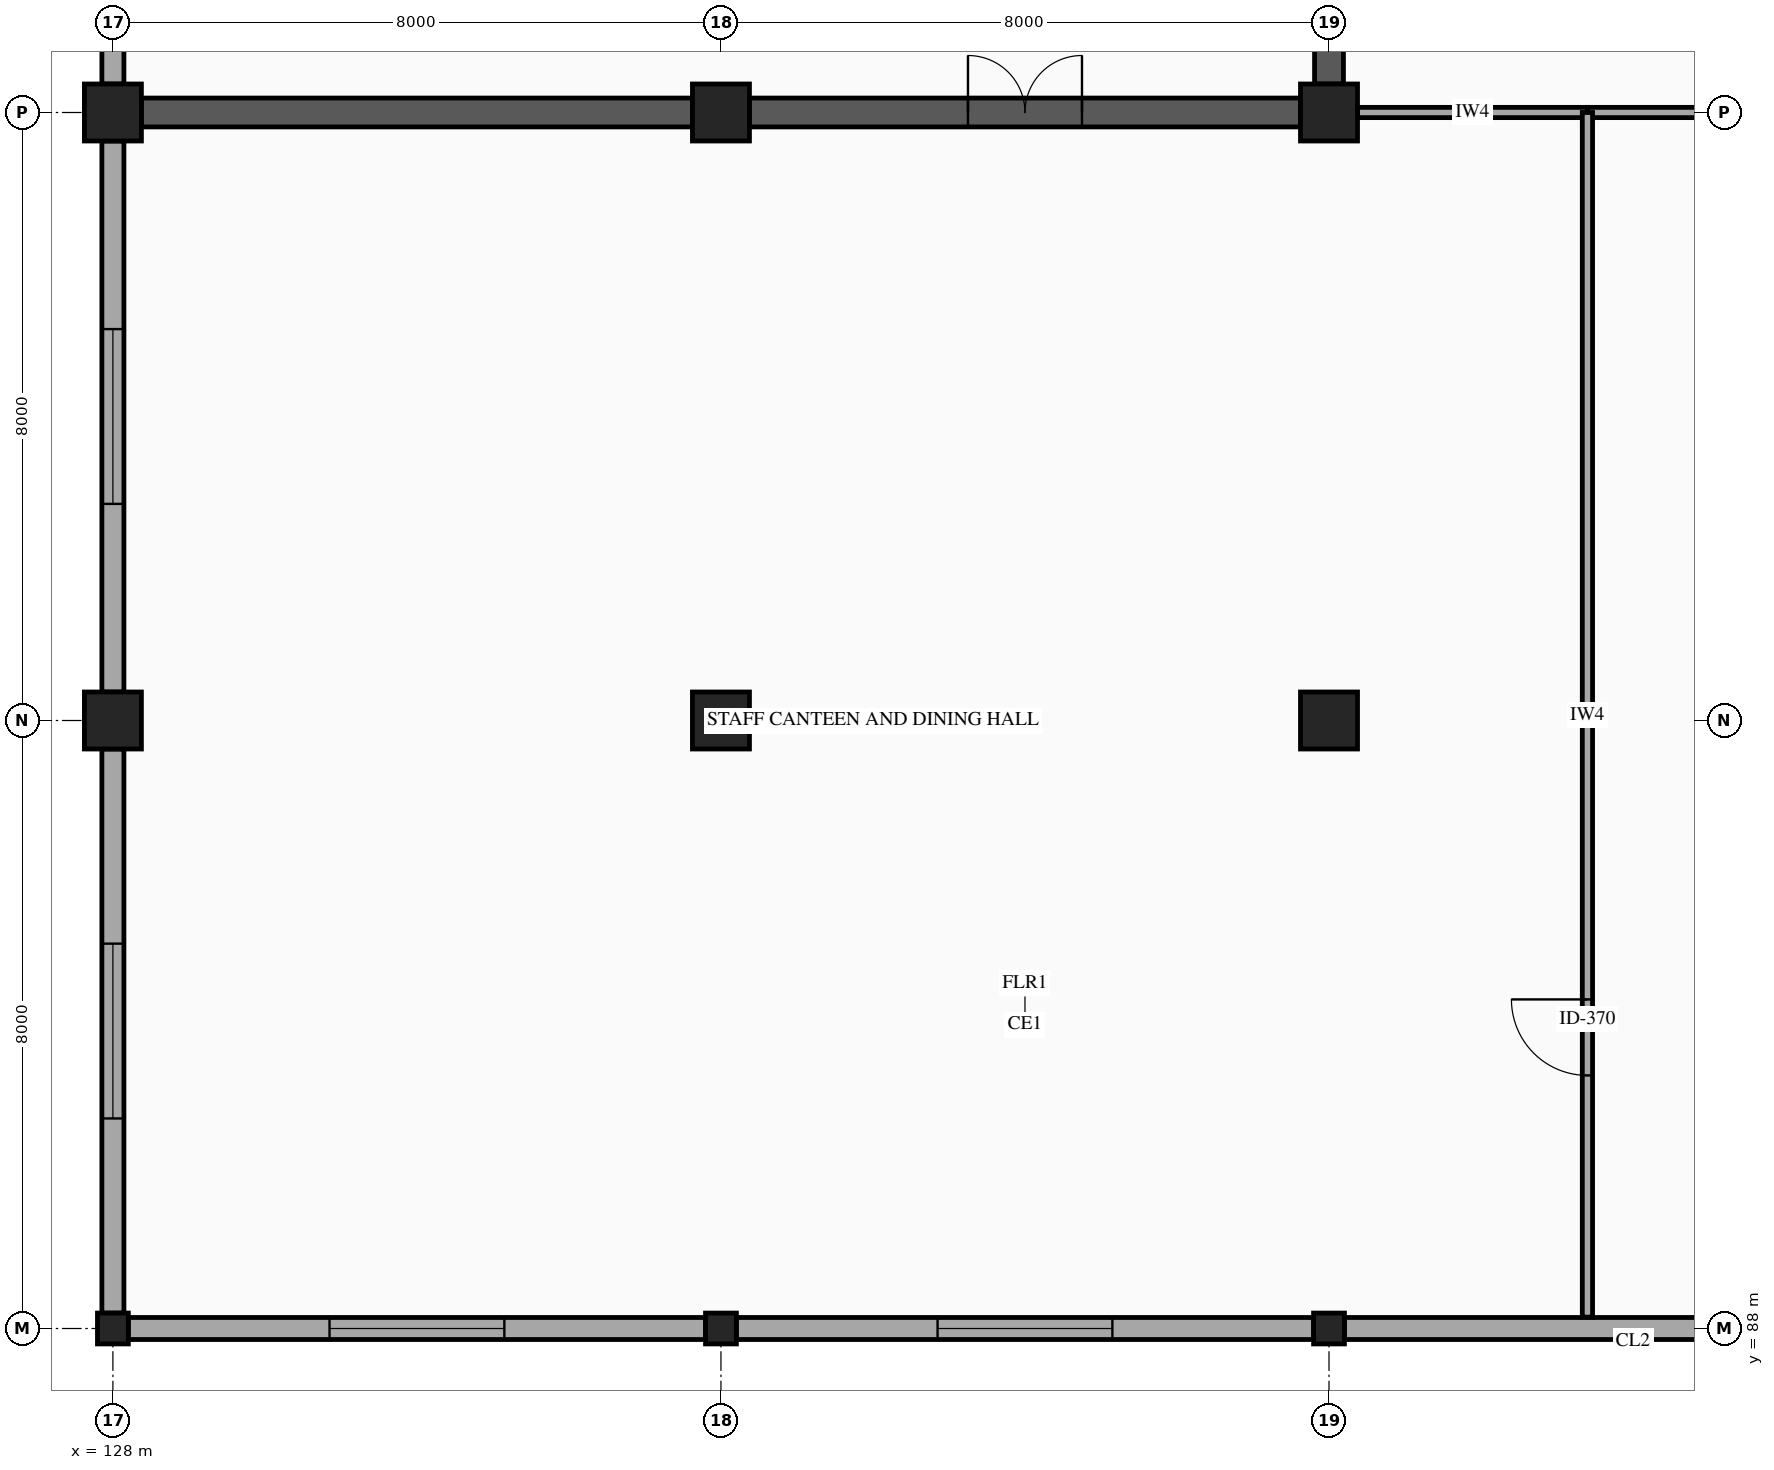
"""IFC4 building model, lengths in metres.
Left out: names, types, materials, properties, quantities, classifications, styles, units other than length and angle.
Written with IfcOpenShell. Run it as: python <this file> out.ifc"""

import sys

from ifc_helpers import new_model, si_unit, direction, frame, frame_2d, origin, origin_2d, place, context, subcontext, project, spatial, rectangle, hollow_circle, extrude, element, fill, save


model = new_model("IFC4")
c1 = context("Model", 3, precision=1e-05, world=origin(), true_north=direction((0.0, 1.0)))
c2 = subcontext(c1, "Body", "Model", "MODEL_VIEW")
j1 = project(units=[si_unit("LENGTHUNIT", "METRE"), si_unit("PLANEANGLEUNIT", "RADIAN")], contexts=[c1])
p1 = place(None, origin())
s1 = spatial("IfcSite", under=j1, at=p1, CompositionType="ELEMENT")
p2 = place(p1, origin())
s2 = spatial("IfcBuilding", under=s1, at=p2, CompositionType="ELEMENT")
p3 = place(p2, frame((0.0, 0.0, 23.9)))
s3 = spatial("IfcBuildingStorey", under=s2, at=p3, CompositionType="ELEMENT", Elevation=23.9)
p4 = place(p3, frame((128.0, 88.0, 0.0), z_axis=(0.0, 0.0, 1.0), x_axis=(1.0, 0.0, 0.0)))
e1 = element("IfcColumn", 1, at=p4, inside=s3, PredefinedType="COLUMN", context=c2, shape_type="SweptSolid", body=[
    extrude(hollow_circle(Radius=0.203, WallThickness=0.012, at=origin_2d()), origin(), (0.0, 0.0, 1.0), 4.5),
])
for number, where, z_axis, x_axis in (
    (2, (128.0, 96.0, 0.0), (0.0, 0.0, 1.0), (1.0, 0.0, 0.0)),
    (3, (128.0, 104.0, 0.0), (0.0, 0.0, 1.0), (1.0, 0.0, 0.0)),
):
    element("IfcColumn", number, at=place(p3, frame(where, z_axis=z_axis, x_axis=x_axis)), inside=s3, PredefinedType="COLUMN", context=c2, shape_type="SweptSolid", body=[
        extrude(rectangle(XDim=0.75, YDim=0.75, at=origin_2d()), origin(), (0.0, 0.0, 1.0), 4.5),
    ])
p5 = place(p3, frame((136.0, 88.0, 0.0), z_axis=(0.0, 0.0, 1.0), x_axis=(1.0, 0.0, 0.0)))
e4 = element("IfcColumn", 4, at=p5, inside=s3, PredefinedType="COLUMN", context=c2, shape_type="SweptSolid", body=[
    extrude(hollow_circle(Radius=0.203, WallThickness=0.012, at=origin_2d()), origin(), (0.0, 0.0, 1.0), 4.5),
])
for number, where, z_axis, x_axis in (
    (5, (136.0, 96.0, 0.0), (0.0, 0.0, 1.0), (1.0, 0.0, 0.0)),
    (6, (136.0, 104.0, 0.0), (0.0, 0.0, 1.0), (1.0, 0.0, 0.0)),
):
    element("IfcColumn", number, at=place(p3, frame(where, z_axis=z_axis, x_axis=x_axis)), inside=s3, PredefinedType="COLUMN", context=c2, shape_type="SweptSolid", body=[
        extrude(rectangle(XDim=0.75, YDim=0.75, at=origin_2d()), origin(), (0.0, 0.0, 1.0), 4.5),
    ])
p6 = place(p3, frame((144.0, 88.0, 0.0), z_axis=(0.0, 0.0, 1.0), x_axis=(1.0, 0.0, 0.0)))
e7 = element("IfcColumn", 7, at=p6, inside=s3, PredefinedType="COLUMN", context=c2, shape_type="SweptSolid", body=[
    extrude(hollow_circle(Radius=0.203, WallThickness=0.012, at=origin_2d()), origin(), (0.0, 0.0, 1.0), 4.5),
])
for number, where, z_axis, x_axis in (
    (8, (144.0, 96.0, 0.0), (0.0, 0.0, 1.0), (1.0, 0.0, 0.0)),
    (9, (144.0, 104.0, 0.0), (0.0, 0.0, 1.0), (1.0, 0.0, 0.0)),
):
    element("IfcColumn", number, at=place(p3, frame(where, z_axis=z_axis, x_axis=x_axis)), inside=s3, PredefinedType="COLUMN", context=c2, shape_type="SweptSolid", body=[
        extrude(rectangle(XDim=0.75, YDim=0.75, at=origin_2d()), origin(), (0.0, 0.0, 1.0), 4.5),
    ])
p7 = place(p3, frame((151.625, 88.0, 0.0), z_axis=(0.0, 0.0, 1.0), x_axis=(-1.0, 0.0, 0.0)))
e10 = element("IfcWall", 10, at=p7, inside=s3, PredefinedType="STANDARD", context=c2, shape_type="SweptSolid", body=[
    extrude(rectangle(XDim=7.422, YDim=0.29, at=frame_2d((3.711, 0.0))), origin(), (0.0, 0.0, 1.0), 3.48),
])
p8 = place(p3, frame((143.797, 88.0, 0.0), z_axis=(0.0, 0.0, 1.0), x_axis=(-1.0, 0.0, 0.0)))
e11 = element("IfcWall", 11, at=p8, inside=s3, PredefinedType="STANDARD", context=c2, shape_type="SweptSolid", body=[
    extrude(rectangle(XDim=7.594, YDim=0.29, at=frame_2d((3.797, 0.0))), origin(), (0.0, 0.0, 1.0), 3.48),
])
p9 = place(p8, frame((2.647, 0.0, 0.8)))
e12 = element("IfcOpeningElement", 12, at=p9, cuts=e11, PredefinedType="OPENING", context=c2, shape_type="SweptSolid", body=[
    extrude(rectangle(XDim=2.3, YDim=1.75, at=frame_2d((1.15, 0.875))), frame((0.0, 0.155, 0.0), z_axis=(0.0, -1.0, 0.0), x_axis=(1.0, 0.0, 0.0)), (0.0, 0.0, 1.0), 0.31),
])
p10 = place(p3, frame((135.797, 88.0, 0.0), z_axis=(0.0, 0.0, 1.0), x_axis=(-1.0, 0.0, 0.0)))
e13 = element("IfcWall", 13, at=p10, inside=s3, PredefinedType="STANDARD", context=c2, shape_type="SweptSolid", body=[
    extrude(rectangle(XDim=7.594, YDim=0.29, at=frame_2d((3.797, 0.0))), origin(), (0.0, 0.0, 1.0), 3.48),
])
p11 = place(p10, frame((2.647, 0.0, 0.8)))
e14 = element("IfcOpeningElement", 14, at=p11, cuts=e13, PredefinedType="OPENING", context=c2, shape_type="SweptSolid", body=[
    extrude(rectangle(XDim=2.3, YDim=1.75, at=frame_2d((1.15, 0.875))), frame((0.0, 0.155, 0.0), z_axis=(0.0, -1.0, 0.0), x_axis=(1.0, 0.0, 0.0)), (0.0, 0.0, 1.0), 0.31),
])
p12 = place(p3, frame((128.0, 88.203, 0.0), z_axis=(0.0, 0.0, 1.0), x_axis=(0.0, 1.0, 0.0)))
e15 = element("IfcWall", 15, at=p12, inside=s3, PredefinedType="STANDARD", context=c2, shape_type="SweptSolid", body=[
    extrude(rectangle(XDim=7.422, YDim=0.29, at=frame_2d((3.711, 0.0))), origin(), (0.0, 0.0, 1.0), 3.48),
])
p13 = place(p12, frame((2.561, 0.0, 0.8)))
e16 = element("IfcOpeningElement", 16, at=p13, cuts=e15, PredefinedType="OPENING", context=c2, shape_type="SweptSolid", body=[
    extrude(rectangle(XDim=2.3, YDim=1.75, at=frame_2d((1.15, 0.875))), frame((0.0, 0.155, 0.0), z_axis=(0.0, -1.0, 0.0), x_axis=(1.0, 0.0, 0.0)), (0.0, 0.0, 1.0), 0.31),
])
p14 = place(p3, frame((128.0, 96.375, 0.0), z_axis=(0.0, 0.0, 1.0), x_axis=(0.0, 1.0, 0.0)))
e17 = element("IfcWall", 17, at=p14, inside=s3, PredefinedType="STANDARD", context=c2, shape_type="SweptSolid", body=[
    extrude(rectangle(XDim=7.25, YDim=0.29, at=frame_2d((3.625, 0.0))), origin(), (0.0, 0.0, 1.0), 3.48),
])
p15 = place(p14, frame((2.475, 0.0, 0.8)))
e18 = element("IfcOpeningElement", 18, at=p15, cuts=e17, PredefinedType="OPENING", context=c2, shape_type="SweptSolid", body=[
    extrude(rectangle(XDim=2.3, YDim=1.75, at=frame_2d((1.15, 0.875))), frame((0.0, 0.155, 0.0), z_axis=(0.0, -1.0, 0.0), x_axis=(1.0, 0.0, 0.0)), (0.0, 0.0, 1.0), 0.31),
])
p16 = place(p3, frame((128.0, 104.375, 0.0), z_axis=(0.0, 0.0, 1.0), x_axis=(0.0, 1.0, 0.0)))
e19 = element("IfcWall", 19, at=p16, inside=s3, PredefinedType="STANDARD", context=c2, shape_type="SweptSolid", body=[
    extrude(rectangle(XDim=7.25, YDim=0.29, at=frame_2d((3.625, 0.0))), origin(), (0.0, 0.0, 1.0), 3.48),
])
p17 = place(p3, frame((128.375, 104.0, 0.0), z_axis=(0.0, 0.0, 1.0), x_axis=(1.0, 0.0, 0.0)))
e20 = element("IfcWall", 20, at=p17, inside=s3, PredefinedType="SHEAR", context=c2, shape_type="SweptSolid", body=[
    extrude(rectangle(XDim=7.25, YDim=0.38, at=frame_2d((3.625, 0.0))), origin(), (0.0, 0.0, 1.0), 4.28),
])
p18 = place(p3, frame((136.375, 104.0, 0.0), z_axis=(0.0, 0.0, 1.0), x_axis=(1.0, 0.0, 0.0)))
e21 = element("IfcWall", 21, at=p18, inside=s3, PredefinedType="SHEAR", context=c2, shape_type="SweptSolid", body=[
    extrude(rectangle(XDim=7.25, YDim=0.38, at=frame_2d((3.625, 0.0))), origin(), (0.0, 0.0, 1.0), 4.28),
])
p19 = place(p18, frame((2.875, 0.0, 0.0)))
e22 = element("IfcOpeningElement", 22, at=p19, cuts=e21, PredefinedType="OPENING", context=c2, shape_type="SweptSolid", body=[
    extrude(rectangle(XDim=1.5, YDim=2.15, at=frame_2d((0.75, 1.075))), frame((0.0, 0.2, 0.0), z_axis=(0.0, -1.0, 0.0), x_axis=(1.0, 0.0, 0.0)), (0.0, 0.0, 1.0), 0.4),
])
p20 = place(p3, frame((144.0, 104.375, 0.0), z_axis=(0.0, 0.0, 1.0), x_axis=(0.0, 1.0, 0.0)))
e23 = element("IfcWall", 23, at=p20, inside=s3, PredefinedType="SHEAR", context=c2, shape_type="SweptSolid", body=[
    extrude(rectangle(XDim=7.25, YDim=0.38, at=frame_2d((3.625, 0.0))), origin(), (0.0, 0.0, 1.0), 4.28),
])
p21 = place(p20, frame((1.838, 0.0, 0.0)))
e24 = element("IfcOpeningElement", 24, at=p21, cuts=e23, PredefinedType="OPENING", context=c2, shape_type="SweptSolid", body=[
    extrude(rectangle(XDim=1.5, YDim=2.15, at=frame_2d((0.75, 1.075))), frame((0.0, 0.2, 0.0), z_axis=(0.0, -1.0, 0.0), x_axis=(1.0, 0.0, 0.0)), (0.0, 0.0, 1.0), 0.4),
])
p22 = place(p3, frame((144.375, 104.0, 0.0), z_axis=(0.0, 0.0, 1.0), x_axis=(1.0, 0.0, 0.0)))
e25 = element("IfcWall", 25, at=p22, inside=s3, PredefinedType="PARTITIONING", context=c2, shape_type="SweptSolid", body=[
    extrude(rectangle(XDim=3.025, YDim=0.135, at=frame_2d((1.512, 0.0))), origin(), (0.0, 0.0, 1.0), 3.48),
])
p23 = place(p3, frame((147.4, 104.0, 0.0), z_axis=(0.0, 0.0, 1.0), x_axis=(1.0, 0.0, 0.0)))
e26 = element("IfcWall", 26, at=p23, inside=s3, PredefinedType="PARTITIONING", context=c2, shape_type="SweptSolid", body=[
    extrude(rectangle(XDim=12.225, YDim=0.135, at=frame_2d((6.113, 0.0))), origin(), (0.0, 0.0, 1.0), 3.48),
])
p24 = place(p23, frame((8.089, 0.0, 0.0)))
e27 = element("IfcOpeningElement", 27, at=p24, cuts=e26, PredefinedType="OPENING", context=c2, shape_type="SweptSolid", body=[
    extrude(rectangle(XDim=1.0, YDim=2.15, at=frame_2d((0.5, 1.075))), frame((0.0, 0.077, 0.0), z_axis=(0.0, -1.0, 0.0), x_axis=(1.0, 0.0, 0.0)), (0.0, 0.0, 1.0), 0.155),
])
p25 = place(p3, frame((147.4, 88.15, 0.0), z_axis=(0.0, 0.0, 1.0), x_axis=(0.0, 1.0, 0.0)))
e28 = element("IfcWall", 28, at=p25, inside=s3, PredefinedType="PARTITIONING", context=c2, shape_type="SweptSolid", body=[
    extrude(rectangle(XDim=15.85, YDim=0.135, at=frame_2d((7.925, 0.0))), origin(), (0.0, 0.0, 1.0), 3.48),
])
p26 = place(p25, frame((3.18, 0.0, 0.0)))
e29 = element("IfcOpeningElement", 29, at=p26, cuts=e28, PredefinedType="OPENING", context=c2, shape_type="SweptSolid", body=[
    extrude(rectangle(XDim=1.0, YDim=2.15, at=frame_2d((0.5, 1.075))), frame((0.0, 0.077, 0.0), z_axis=(0.0, -1.0, 0.0), x_axis=(1.0, 0.0, 0.0)), (0.0, 0.0, 1.0), 0.155),
])
p27 = place(p9, origin())
e30 = element("IfcWindow", 30, at=p27, inside=s3, PartitioningType="DOUBLE_PANEL_VERTICAL", PredefinedType="WINDOW", context=c2, shape_type="SweptSolid", body=[
    extrude(rectangle(XDim=2.3, YDim=1.75, at=frame_2d((1.15, 0.875))), frame((0.0, 0.03, 0.0), z_axis=(0.0, -1.0, 0.0), x_axis=(1.0, 0.0, 0.0)), (0.0, 0.0, 1.0), 0.06),
])
fill(e12, e30)
p28 = place(p11, origin())
e31 = element("IfcWindow", 31, at=p28, inside=s3, PartitioningType="DOUBLE_PANEL_VERTICAL", PredefinedType="WINDOW", context=c2, shape_type="SweptSolid", body=[
    extrude(rectangle(XDim=2.3, YDim=1.75, at=frame_2d((1.15, 0.875))), frame((0.0, 0.03, 0.0), z_axis=(0.0, -1.0, 0.0), x_axis=(1.0, 0.0, 0.0)), (0.0, 0.0, 1.0), 0.06),
])
fill(e14, e31)
p29 = place(p13, origin())
e32 = element("IfcWindow", 32, at=p29, inside=s3, PartitioningType="DOUBLE_PANEL_VERTICAL", PredefinedType="WINDOW", context=c2, shape_type="SweptSolid", body=[
    extrude(rectangle(XDim=2.3, YDim=1.75, at=frame_2d((1.15, 0.875))), frame((0.0, 0.03, 0.0), z_axis=(0.0, -1.0, 0.0), x_axis=(1.0, 0.0, 0.0)), (0.0, 0.0, 1.0), 0.06),
])
fill(e16, e32)
p30 = place(p15, origin())
e33 = element("IfcWindow", 33, at=p30, inside=s3, PartitioningType="DOUBLE_PANEL_VERTICAL", PredefinedType="WINDOW", context=c2, shape_type="SweptSolid", body=[
    extrude(rectangle(XDim=2.3, YDim=1.75, at=frame_2d((1.15, 0.875))), frame((0.0, 0.03, 0.0), z_axis=(0.0, -1.0, 0.0), x_axis=(1.0, 0.0, 0.0)), (0.0, 0.0, 1.0), 0.06),
])
fill(e18, e33)
p31 = place(p19, origin())
e34 = element("IfcDoor", 34, at=p31, inside=s3, OperationType="DOUBLE_DOOR_SINGLE_SWING", PredefinedType="DOOR", context=c2, shape_type="SweptSolid", body=[
    extrude(rectangle(XDim=1.5, YDim=2.15, at=frame_2d((0.75, 1.075))), frame((0.0, 0.025, 0.0), z_axis=(0.0, -1.0, 0.0), x_axis=(1.0, 0.0, 0.0)), (0.0, 0.0, 1.0), 0.05),
])
fill(e22, e34)
p32 = place(p26, origin())
e35 = element("IfcDoor", 35, at=p32, inside=s3, OperationType="SINGLE_SWING_RIGHT", PredefinedType="DOOR", context=c2, shape_type="SweptSolid", body=[
    extrude(rectangle(XDim=1.0, YDim=2.15, at=frame_2d((0.5, 1.075))), frame((0.0, 0.025, 0.0), z_axis=(0.0, -1.0, 0.0), x_axis=(1.0, 0.0, 0.0)), (0.0, 0.0, 1.0), 0.05),
])
fill(e29, e35)
save(model, sys.argv[1])
